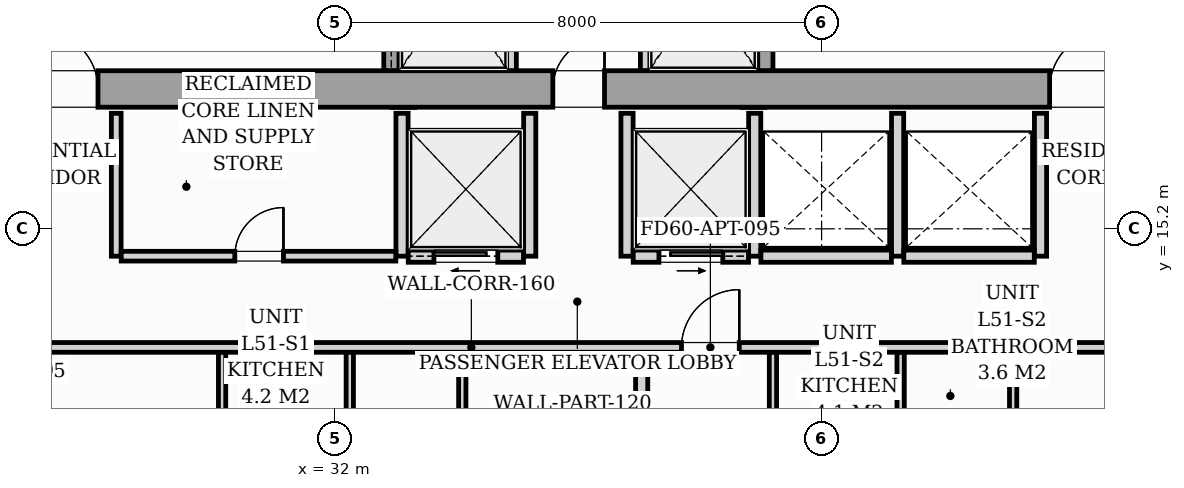
"""IFC4 building model, lengths in metres.
Left out: names, types, materials, properties, quantities, classifications, styles, units other than length and angle.
Written with IfcOpenShell. Run it as: python <this file> out.ifc"""

import sys

from ifc_helpers import new_model, si_unit, direction, frame, frame_2d, origin, origin_2d, place, context, subcontext, project, spatial, rectangle, i_section, extrude, source, transform, mapped, element, fill, save


model = new_model("IFC4")
c1 = context("Model", 3, precision=1e-05, world=origin(), true_north=direction((0.0, 1.0)))
c2 = subcontext(c1, "Body", "Model", "MODEL_VIEW")
j1 = project(units=[si_unit("LENGTHUNIT", "METRE"), si_unit("PLANEANGLEUNIT", "RADIAN")], contexts=[c1])
p1 = place(None, origin())
s1 = spatial("IfcSite", under=j1, at=p1, CompositionType="ELEMENT")
p2 = place(p1, origin())
s2 = spatial("IfcBuilding", under=s1, at=p2, CompositionType="ELEMENT")
p3 = place(p2, frame((0.0, 0.0, 179.4)))
s3 = spatial("IfcBuildingStorey", under=s2, at=p3, CompositionType="ELEMENT", Elevation=179.4)
m1 = source(origin(), c2, "Body", "SweptSolid", [
    extrude(i_section(OverallWidth=0.416, OverallDepth=0.446, WebThickness=0.039, FlangeThickness=0.063, FilletRadius=0.018, at=origin_2d()), origin(), (0.0, 0.0, 1.0), 3.196),
])
for number, where, z_axis, x_axis in (
    (1, (33.12, 17.4, 0.002), (0.0, 0.0, 1.0), (1.0, 0.0, 0.0)),
    (2, (38.88, 17.4, 0.002), (0.0, 0.0, 1.0), (1.0, 0.0, 0.0)),
):
    element("IfcColumn", number, at=place(p3, frame(where, z_axis=z_axis, x_axis=x_axis)), inside=s3, PredefinedType="PILASTER", context=c2, shape_type="MappedRepresentation", body=[
        mapped(m1, transform((0.0, 0.0, 0.0), scale=1.0)),
    ])
p4 = place(p3, frame((26.2, 17.5, 0.0), z_axis=(0.0, 0.0, 1.0), x_axis=(1.0, 0.0, 0.0)))
e3 = element("IfcWall", 3, at=p4, inside=s3, PredefinedType="SHEAR", context=c2, shape_type="SweptSolid", body=[
    extrude(rectangle(XDim=19.6, YDim=0.6, at=frame_2d((9.8, 0.0))), origin(), (0.0, 0.0, 1.0), 3.2),
])
p5 = place(p4, frame((0.95, 0.0, 0.0)))
e4 = element("IfcOpeningElement", 4, at=p5, cuts=e3, PredefinedType="OPENING", context=c2, shape_type="SweptSolid", body=[
    extrude(rectangle(XDim=0.95, YDim=2.06, at=frame_2d((0.475, 1.03))), frame((0.0, 0.31, 0.0), z_axis=(0.0, -1.0, 0.0), x_axis=(1.0, 0.0, 0.0)), (0.0, 0.0, 1.0), 0.62),
])
p6 = place(p4, frame((9.38, 0.0, 0.0)))
e5 = element("IfcOpeningElement", 5, at=p6, cuts=e3, PredefinedType="OPENING", context=c2, shape_type="SweptSolid", body=[
    extrude(rectangle(XDim=0.85, YDim=2.0, at=frame_2d((0.425, 1.0))), frame((0.0, 0.31, 0.0), z_axis=(0.0, -1.0, 0.0), x_axis=(1.0, 0.0, 0.0)), (0.0, 0.0, 1.0), 0.62),
])
p7 = place(p4, frame((17.55, 0.0, 0.0)))
e6 = element("IfcOpeningElement", 6, at=p7, cuts=e3, PredefinedType="OPENING", context=c2, shape_type="SweptSolid", body=[
    extrude(rectangle(XDim=0.95, YDim=2.06, at=frame_2d((0.475, 1.03))), frame((0.0, 0.31, 0.0), z_axis=(0.0, -1.0, 0.0), x_axis=(1.0, 0.0, 0.0)), (0.0, 0.0, 1.0), 0.62),
])
p8 = place(p3, frame((32.925, 17.802, 0.0), z_axis=(0.0, 0.0, 1.0), x_axis=(0.0, 1.0, 0.0)))
e7 = element("IfcWall", 7, at=p8, inside=s3, PredefinedType="SOLIDWALL", context=c2, shape_type="SweptSolid", body=[
    extrude(rectangle(XDim=2.646, YDim=0.25, at=frame_2d((1.323, 0.0))), origin(), (0.0, 0.0, 1.0), 3.2),
])
p9 = place(p8, frame((0.548, 0.0, 0.0)))
e8 = element("IfcOpeningElement", 8, at=p9, cuts=e7, PredefinedType="OPENING", context=c2, shape_type="SweptSolid", body=[
    extrude(rectangle(XDim=1.1, YDim=2.08, at=frame_2d((0.55, 1.04))), frame((0.0, 0.135, 0.0), z_axis=(0.0, -1.0, 0.0), x_axis=(1.0, 0.0, 0.0)), (0.0, 0.0, 1.0), 0.27),
])
for number, where, z_axis, x_axis in (
    (9, (34.9, 17.802, 0.0), (0.0, 0.0, 1.0), (0.0, 1.0, 0.0)),
    (10, (37.1, 17.802, 0.0), (0.0, 0.0, 1.0), (0.0, 1.0, 0.0)),
):
    element("IfcWall", number, at=place(p3, frame(where, z_axis=z_axis, x_axis=x_axis)), inside=s3, PredefinedType="PARTITIONING", context=c2, shape_type="SweptSolid", body=[
        extrude(rectangle(XDim=2.646, YDim=0.16, at=frame_2d((1.323, 0.0))), origin(), (0.0, 0.0, 1.0), 2.94),
    ])
p10 = place(p3, frame((39.075, 17.802, 0.0), z_axis=(0.0, 0.0, 1.0), x_axis=(0.0, 1.0, 0.0)))
e11 = element("IfcWall", 11, at=p10, inside=s3, PredefinedType="SOLIDWALL", context=c2, shape_type="SweptSolid", body=[
    extrude(rectangle(XDim=2.646, YDim=0.25, at=frame_2d((1.323, 0.0))), origin(), (0.0, 0.0, 1.0), 3.2),
])
p11 = place(p10, frame((0.548, 0.0, 0.0)))
e12 = element("IfcOpeningElement", 12, at=p11, cuts=e11, PredefinedType="OPENING", context=c2, shape_type="SweptSolid", body=[
    extrude(rectangle(XDim=1.1, YDim=2.08, at=frame_2d((0.55, 1.04))), frame((0.0, 0.135, 0.0), z_axis=(0.0, -1.0, 0.0), x_axis=(1.0, 0.0, 0.0)), (0.0, 0.0, 1.0), 0.27),
])
p12 = place(p3, frame((28.4, 14.75, 0.0), z_axis=(0.0, 0.0, 1.0), x_axis=(0.0, 1.0, 0.0)))
e13 = element("IfcWall", 13, at=p12, inside=s3, PredefinedType="PARTITIONING", context=c2, shape_type="SweptSolid", body=[
    extrude(rectangle(XDim=2.35, YDim=0.16, at=frame_2d((1.175, 0.0))), origin(), (0.0, 0.0, 1.0), 2.94),
])
p13 = place(p3, frame((33.1, 14.75, 0.0), z_axis=(0.0, 0.0, 1.0), x_axis=(0.0, 1.0, 0.0)))
e14 = element("IfcWall", 14, at=p13, inside=s3, PredefinedType="PARTITIONING", context=c2, shape_type="SweptSolid", body=[
    extrude(rectangle(XDim=2.35, YDim=0.2, at=frame_2d((1.175, 0.0))), origin(), (0.0, 0.0, 1.0), 2.94),
])
p14 = place(p3, frame((28.482, 14.75, 0.0), z_axis=(0.0, 0.0, 1.0), x_axis=(1.0, 0.0, 0.0)))
e15 = element("IfcWall", 15, at=p14, inside=s3, PredefinedType="PARTITIONING", context=c2, shape_type="SweptSolid", body=[
    extrude(rectangle(XDim=4.516, YDim=0.16, at=frame_2d((2.258, 0.0))), origin(), (0.0, 0.0, 1.0), 2.94),
])
p15 = place(p14, frame((1.868, 0.0, 0.0)))
e16 = element("IfcOpeningElement", 16, at=p15, cuts=e15, PredefinedType="OPENING", context=c2, shape_type="SweptSolid", body=[
    extrude(rectangle(XDim=0.8, YDim=2.05, at=frame_2d((0.4, 1.025))), frame((0.0, 0.09, 0.0), z_axis=(0.0, -1.0, 0.0), x_axis=(1.0, 0.0, 0.0)), (0.0, 0.0, 1.0), 0.18),
])
p16 = place(p3, frame((35.2, 14.75, 0.0), z_axis=(0.0, 0.0, 1.0), x_axis=(0.0, 1.0, 0.0)))
e17 = element("IfcWall", 17, at=p16, inside=s3, PredefinedType="PARTITIONING", context=c2, shape_type="SweptSolid", body=[
    extrude(rectangle(XDim=2.35, YDim=0.2, at=frame_2d((1.175, 0.0))), origin(), (0.0, 0.0, 1.0), 2.94),
])
p17 = place(p3, frame((33.202, 14.75, 0.0), z_axis=(0.0, 0.0, 1.0), x_axis=(1.0, 0.0, 0.0)))
e18 = element("IfcWall", 18, at=p17, inside=s3, PredefinedType="PARTITIONING", context=c2, shape_type="SweptSolid", body=[
    extrude(rectangle(XDim=1.896, YDim=0.2, at=frame_2d((0.948, 0.0))), origin(), (0.0, 0.0, 1.0), 2.94),
])
p18 = place(p17, frame((0.423, 0.0, 0.0)))
e19 = element("IfcOpeningElement", 19, at=p18, cuts=e18, PredefinedType="OPENING", context=c2, shape_type="SweptSolid", body=[
    extrude(rectangle(XDim=1.05, YDim=2.08, at=frame_2d((0.525, 1.04))), frame((0.0, 0.11, 0.0), z_axis=(0.0, -1.0, 0.0), x_axis=(1.0, 0.0, 0.0)), (0.0, 0.0, 1.0), 0.22),
])
for number, where, z_axis, x_axis in (
    (20, (36.8, 14.75, 0.0), (0.0, 0.0, 1.0), (0.0, 1.0, 0.0)),
    (21, (38.9, 14.75, 0.0), (0.0, 0.0, 1.0), (0.0, 1.0, 0.0)),
):
    element("IfcWall", number, at=place(p3, frame(where, z_axis=z_axis, x_axis=x_axis)), inside=s3, PredefinedType="PARTITIONING", context=c2, shape_type="SweptSolid", body=[
        extrude(rectangle(XDim=2.35, YDim=0.2, at=frame_2d((1.175, 0.0))), origin(), (0.0, 0.0, 1.0), 2.94),
    ])
p19 = place(p3, frame((36.902, 14.75, 0.0), z_axis=(0.0, 0.0, 1.0), x_axis=(1.0, 0.0, 0.0)))
e22 = element("IfcWall", 22, at=p19, inside=s3, PredefinedType="PARTITIONING", context=c2, shape_type="SweptSolid", body=[
    extrude(rectangle(XDim=1.896, YDim=0.2, at=frame_2d((0.948, 0.0))), origin(), (0.0, 0.0, 1.0), 2.94),
])
p20 = place(p19, frame((0.423, 0.0, 0.0)))
e23 = element("IfcOpeningElement", 23, at=p20, cuts=e22, PredefinedType="OPENING", context=c2, shape_type="SweptSolid", body=[
    extrude(rectangle(XDim=1.05, YDim=2.08, at=frame_2d((0.525, 1.04))), frame((0.0, 0.11, 0.0), z_axis=(0.0, -1.0, 0.0), x_axis=(1.0, 0.0, 0.0)), (0.0, 0.0, 1.0), 0.22),
])
for number, where, z_axis, x_axis in (
    (24, (41.25, 14.75, 0.0), (0.0, 0.0, 1.0), (0.0, 1.0, 0.0)),
    (25, (43.6, 14.75, 0.0), (0.0, 0.0, 1.0), (0.0, 1.0, 0.0)),
):
    element("IfcWall", number, at=place(p3, frame(where, z_axis=z_axis, x_axis=x_axis)), inside=s3, PredefinedType="PARTITIONING", context=c2, shape_type="SweptSolid", body=[
        extrude(rectangle(XDim=2.35, YDim=0.2, at=frame_2d((1.175, 0.0))), origin(), (0.0, 0.0, 1.0), 2.94),
    ])
for number, where, z_axis, x_axis in (
    (26, (39.002, 14.75, 0.0), (0.0, 0.0, 1.0), (1.0, 0.0, 0.0)),
    (27, (41.352, 14.75, 0.0), (0.0, 0.0, 1.0), (1.0, 0.0, 0.0)),
):
    element("IfcWall", number, at=place(p3, frame(where, z_axis=z_axis, x_axis=x_axis)), inside=s3, PredefinedType="PARTITIONING", context=c2, shape_type="SweptSolid", body=[
        extrude(rectangle(XDim=2.146, YDim=0.2, at=frame_2d((1.073, 0.0))), origin(), (0.0, 0.0, 1.0), 2.94),
    ])
p21 = place(p3, frame((22.6, 13.25, 0.0), z_axis=(0.0, 0.0, 1.0), x_axis=(1.0, 0.0, 0.0)))
e28 = element("IfcWall", 28, at=p21, inside=s3, PredefinedType="PARTITIONING", context=c2, shape_type="SweptSolid", body=[
    extrude(rectangle(XDim=23.28, YDim=0.16, at=frame_2d((11.64, 0.0))), origin(), (0.0, 0.0, 1.0), 2.94),
])
p22 = place(p21, frame((3.335, 0.0, 0.0)))
e29 = element("IfcOpeningElement", 29, at=p22, cuts=e28, PredefinedType="OPENING", context=c2, shape_type="SweptSolid", body=[
    extrude(rectangle(XDim=0.95, YDim=2.06, at=frame_2d((0.475, 1.03))), frame((0.0, 0.09, 0.0), z_axis=(0.0, -1.0, 0.0), x_axis=(1.0, 0.0, 0.0)), (0.0, 0.0, 1.0), 0.18),
])
p23 = place(p21, frame((15.096, 0.0, 0.0)))
e30 = element("IfcOpeningElement", 30, at=p23, cuts=e28, PredefinedType="OPENING", context=c2, shape_type="SweptSolid", body=[
    extrude(rectangle(XDim=0.95, YDim=2.06, at=frame_2d((0.475, 1.03))), frame((0.0, 0.09, 0.0), z_axis=(0.0, -1.0, 0.0), x_axis=(1.0, 0.0, 0.0)), (0.0, 0.0, 1.0), 0.18),
])
p24 = place(p3, frame((34.091, 7.846, 0.0), z_axis=(0.0, 0.0, 1.0), x_axis=(0.0, 1.0, 0.0)))
e31 = element("IfcWall", 31, at=p24, inside=s3, PredefinedType="PARTITIONING", context=c2, shape_type="SweptSolid", body=[
    extrude(rectangle(XDim=5.322, YDim=0.12, at=frame_2d((2.661, 0.0))), origin(), (0.0, 0.0, 1.0), 2.94),
])
p25 = place(p24, frame((2.176, 0.0, 0.0)))
e32 = element("IfcOpeningElement", 32, at=p25, cuts=e31, PredefinedType="OPENING", context=c2, shape_type="SweptSolid", body=[
    extrude(rectangle(XDim=0.9, YDim=2.05, at=frame_2d((0.45, 1.025))), frame((0.0, 0.07, 0.0), z_axis=(0.0, -1.0, 0.0), x_axis=(1.0, 0.0, 0.0)), (0.0, 0.0, 1.0), 0.14),
])
for number, where, z_axis, x_axis in (
    (33, (32.241, 11.062, 0.0), (0.0, 0.0, 1.0), (0.0, 1.0, 0.0)),
    (34, (30.141, 11.062, 0.0), (0.0, 0.0, 1.0), (0.0, 1.0, 0.0)),
):
    element("IfcWall", number, at=place(p3, frame(where, z_axis=z_axis, x_axis=x_axis)), inside=s3, PredefinedType="PARTITIONING", context=c2, shape_type="SweptSolid", body=[
        extrude(rectangle(XDim=2.106, YDim=0.12, at=frame_2d((1.053, 0.0))), origin(), (0.0, 0.0, 1.0), 2.94),
    ])
p26 = place(p3, frame((37.041, 8.13, 0.0), z_axis=(0.0, 0.0, 1.0), x_axis=(0.0, 1.0, 0.0)))
e35 = element("IfcWall", 35, at=p26, inside=s3, PredefinedType="PARTITIONING", context=c2, shape_type="SweptSolid", body=[
    extrude(rectangle(XDim=5.038, YDim=0.2, at=frame_2d((2.519, 0.0))), origin(), (0.0, 0.0, 1.0), 2.94),
])
p27 = place(p3, frame((43.15, 8.718, 0.0), z_axis=(0.0, 0.0, 1.0), x_axis=(0.0, 1.0, 0.0)))
e36 = element("IfcWall", 36, at=p27, inside=s3, PredefinedType="PARTITIONING", context=c2, shape_type="SweptSolid", body=[
    extrude(rectangle(XDim=4.45, YDim=0.12, at=frame_2d((2.225, 0.0))), origin(), (0.0, 0.0, 1.0), 2.94),
])
p28 = place(p27, frame((2.386, 0.0, 0.0)))
e37 = element("IfcOpeningElement", 37, at=p28, cuts=e36, PredefinedType="OPENING", context=c2, shape_type="SweptSolid", body=[
    extrude(rectangle(XDim=0.9, YDim=2.05, at=frame_2d((0.45, 1.025))), frame((0.0, 0.07, 0.0), z_axis=(0.0, -1.0, 0.0), x_axis=(1.0, 0.0, 0.0)), (0.0, 0.0, 1.0), 0.14),
])
p29 = place(p3, frame((41.3, 11.09, 0.0), z_axis=(0.0, 0.0, 1.0), x_axis=(0.0, 1.0, 0.0)))
e38 = element("IfcWall", 38, at=p29, inside=s3, PredefinedType="PARTITIONING", context=c2, shape_type="SweptSolid", body=[
    extrude(rectangle(XDim=2.078, YDim=0.12, at=frame_2d((1.039, 0.0))), origin(), (0.0, 0.0, 1.0), 2.94),
])
p30 = place(p3, frame((39.2, 11.09, 0.0), z_axis=(0.0, 0.0, 1.0), x_axis=(0.0, 1.0, 0.0)))
e39 = element("IfcWall", 39, at=p30, inside=s3, PredefinedType="PARTITIONING", context=c2, shape_type="SweptSolid", body=[
    extrude(rectangle(XDim=2.078, YDim=0.12, at=frame_2d((1.039, 0.0))), origin(), (0.0, 0.0, 1.0), 2.94),
])
p31 = place(p30, frame((0.18, 0.0, 0.0)))
e40 = element("IfcOpeningElement", 40, at=p31, cuts=e39, PredefinedType="OPENING", context=c2, shape_type="SweptSolid", body=[
    extrude(rectangle(XDim=0.85, YDim=2.05, at=frame_2d((0.425, 1.025))), frame((0.0, 0.07, 0.0), z_axis=(0.0, -1.0, 0.0), x_axis=(1.0, 0.0, 0.0)), (0.0, 0.0, 1.0), 0.14),
])
m2 = source(origin(), c2, "Body", "SweptSolid", [
    extrude(rectangle(XDim=0.95, YDim=2.06, at=frame_2d((0.475, 1.03))), frame((0.0, 0.025, 0.0), z_axis=(0.0, -1.0, 0.0), x_axis=(1.0, 0.0, 0.0)), (0.0, 0.0, 1.0), 0.05),
])
p32 = place(p5, origin())
e41 = element("IfcDoor", 41, at=p32, inside=s3, OperationType="SINGLE_SWING_LEFT", PredefinedType="DOOR", context=c2, shape_type="MappedRepresentation", body=[
    mapped(m2, transform((0.0, 0.0, 0.0), scale=1.0)),
])
fill(e4, e41)
m3 = source(origin(), c2, "Body", "SweptSolid", [
    extrude(rectangle(XDim=0.85, YDim=2.0, at=frame_2d((0.425, 1.0))), frame((0.0, 0.025, 0.0), z_axis=(0.0, -1.0, 0.0), x_axis=(1.0, 0.0, 0.0)), (0.0, 0.0, 1.0), 0.05),
])
p33 = place(p6, origin())
e42 = element("IfcDoor", 42, at=p33, inside=s3, OperationType="SINGLE_SWING_RIGHT", PredefinedType="DOOR", context=c2, shape_type="MappedRepresentation", body=[
    mapped(m3, transform((0.0, 0.0, 0.0), scale=1.0)),
])
fill(e5, e42)
p34 = place(p7, origin())
e43 = element("IfcDoor", 43, at=p34, inside=s3, OperationType="SINGLE_SWING_RIGHT", PredefinedType="DOOR", context=c2, shape_type="MappedRepresentation", body=[
    mapped(m2, transform((0.0, 0.0, 0.0), scale=1.0)),
])
fill(e6, e43)
m4 = source(origin(), c2, "Body", "SweptSolid", [
    extrude(rectangle(XDim=0.8, YDim=2.05, at=frame_2d((0.4, 1.025))), frame((0.0, 0.025, 0.0), z_axis=(0.0, -1.0, 0.0), x_axis=(1.0, 0.0, 0.0)), (0.0, 0.0, 1.0), 0.05),
])
p35 = place(p15, origin())
e44 = element("IfcDoor", 44, at=p35, inside=s3, OperationType="SINGLE_SWING_RIGHT", PredefinedType="DOOR", context=c2, shape_type="MappedRepresentation", body=[
    mapped(m4, transform((0.0, 0.0, 0.0), scale=1.0)),
])
fill(e16, e44)
m5 = source(origin(), c2, "Body", "SweptSolid", [
    extrude(rectangle(XDim=1.05, YDim=2.08, at=frame_2d((0.525, 1.04))), frame((0.0, 0.025, 0.0), z_axis=(0.0, -1.0, 0.0), x_axis=(1.0, 0.0, 0.0)), (0.0, 0.0, 1.0), 0.05),
])
p36 = place(p18, origin())
e45 = element("IfcDoor", 45, at=p36, inside=s3, OperationType="SLIDING_TO_LEFT", PredefinedType="DOOR", context=c2, shape_type="MappedRepresentation", body=[
    mapped(m5, transform((0.0, 0.0, 0.0), scale=1.0)),
])
fill(e19, e45)
p37 = place(p20, origin())
e46 = element("IfcDoor", 46, at=p37, inside=s3, OperationType="SLIDING_TO_RIGHT", PredefinedType="DOOR", context=c2, shape_type="MappedRepresentation", body=[
    mapped(m5, transform((0.0, 0.0, 0.0), scale=1.0)),
])
fill(e23, e46)
m6 = source(origin(), c2, "Body", "SweptSolid", [
    extrude(rectangle(XDim=0.95, YDim=2.06, at=frame_2d((0.475, 1.03))), frame((0.0, 0.025, 0.0), z_axis=(0.0, -1.0, 0.0), x_axis=(1.0, 0.0, 0.0)), (0.0, 0.0, 1.0), 0.05),
])
p38 = place(p23, origin())
e47 = element("IfcDoor", 47, at=p38, inside=s3, OperationType="SINGLE_SWING_RIGHT", PredefinedType="DOOR", context=c2, shape_type="MappedRepresentation", body=[
    mapped(m6, transform((0.0, 0.0, 0.0), scale=1.0)),
])
fill(e30, e47)
save(model, sys.argv[1])
